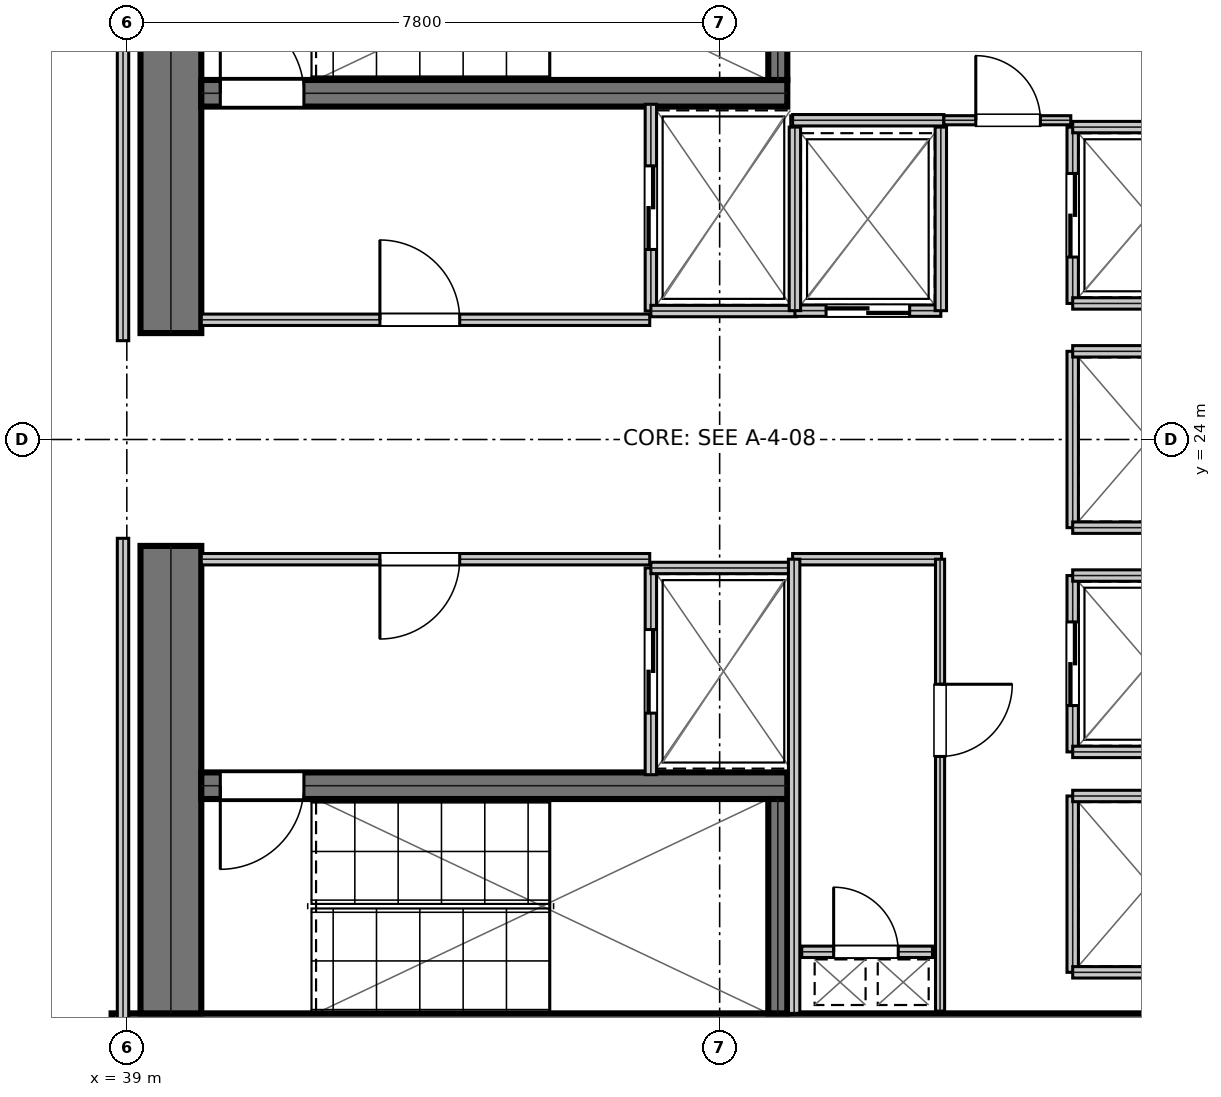
"""IFC4 building model, lengths in metres.
Left out: names, types, materials, properties, quantities, classifications, styles, units other than length and angle.
Written with IfcOpenShell. Run it as: python <this file> out.ifc"""

import sys

from ifc_helpers import new_model, si_unit, direction, frame, frame_2d, origin, place, context, subcontext, project, spatial, rectangle, extrude, element, fill, save


model = new_model("IFC4")
c1 = context("Model", 3, precision=1e-05, world=origin(), true_north=direction((0.0, 1.0)))
c2 = subcontext(c1, "Body", "Model", "MODEL_VIEW")
j1 = project(units=[si_unit("LENGTHUNIT", "METRE"), si_unit("PLANEANGLEUNIT", "RADIAN")], contexts=[c1])
p1 = place(None, origin())
s1 = spatial("IfcSite", under=j1, at=p1, CompositionType="ELEMENT")
p2 = place(p1, origin())
s2 = spatial("IfcBuilding", under=s1, at=p2, CompositionType="ELEMENT")
p3 = place(p2, frame((0.0, 0.0, 133.05)))
s3 = spatial("IfcBuildingStorey", under=s2, at=p3, CompositionType="ELEMENT", Elevation=133.05)
p4 = place(p3, frame((38.8, 16.05, 0.0), z_axis=(0.0, 0.0, 1.0), x_axis=(1.0, 0.0, 0.0)))
e1 = element("IfcWall", 1, at=p4, inside=s3, PredefinedType="SHEAR", context=c2, shape_type="SweptSolid", body=[
    extrude(rectangle(XDim=16.0, YDim=0.8, at=frame_2d((8.0, 0.0))), origin(), (0.0, 0.0, 1.0), 3.81),
])
for number, where, z_axis, x_axis in (
    (2, (39.58, 16.45, 0.0), (0.0, 0.0, 1.0), (0.0, 1.0, 0.0)),
    (3, (39.58, 25.4, 0.0), (0.0, 0.0, 1.0), (0.0, 1.0, 0.0)),
):
    element("IfcWall", number, at=place(p3, frame(where, z_axis=z_axis, x_axis=x_axis)), inside=s3, PredefinedType="SHEAR", context=c2, shape_type="SweptSolid", body=[
        extrude(rectangle(XDim=6.15, YDim=0.8, at=frame_2d((3.075, 0.0))), origin(), (0.0, 0.0, 1.0), 3.81),
    ])
p5 = place(p3, frame((39.98, 28.555, 0.0), z_axis=(0.0, 0.0, 1.0), x_axis=(1.0, 0.0, 0.0)))
e4 = element("IfcWall", 4, at=p5, inside=s3, PredefinedType="SHEAR", context=c2, shape_type="SweptSolid", body=[
    extrude(rectangle(XDim=7.71, YDim=0.35, at=frame_2d((3.855, 0.0))), origin(), (0.0, 0.0, 1.0), 3.81),
])
p6 = place(p5, frame((0.25, 0.0, 0.0)))
e5 = element("IfcOpeningElement", 5, at=p6, cuts=e4, PredefinedType="OPENING", context=c2, shape_type="SweptSolid", body=[
    extrude(rectangle(XDim=1.1, YDim=2.15, at=frame_2d((0.55, 1.075))), frame((0.0, 0.185, 0.0), z_axis=(0.0, -1.0, 0.0), x_axis=(1.0, 0.0, 0.0)), (0.0, 0.0, 1.0), 0.37),
])
p7 = place(p3, frame((39.98, 19.445, 0.0), z_axis=(0.0, 0.0, 1.0), x_axis=(1.0, 0.0, 0.0)))
e6 = element("IfcWall", 6, at=p7, inside=s3, PredefinedType="SHEAR", context=c2, shape_type="SweptSolid", body=[
    extrude(rectangle(XDim=7.71, YDim=0.35, at=frame_2d((3.855, 0.0))), origin(), (0.0, 0.0, 1.0), 3.81),
])
p8 = place(p7, frame((0.25, 0.0, 0.0)))
e7 = element("IfcOpeningElement", 7, at=p8, cuts=e6, PredefinedType="OPENING", context=c2, shape_type="SweptSolid", body=[
    extrude(rectangle(XDim=1.1, YDim=2.15, at=frame_2d((0.55, 1.075))), frame((0.0, 0.185, 0.0), z_axis=(0.0, -1.0, 0.0), x_axis=(1.0, 0.0, 0.0)), (0.0, 0.0, 1.0), 0.37),
])
for number, where, z_axis, x_axis in (
    (8, (47.565, 28.73, 0.0), (0.0, 0.0, 1.0), (0.0, 1.0, 0.0)),
    (9, (47.565, 16.45, 0.0), (0.0, 0.0, 1.0), (0.0, 1.0, 0.0)),
):
    element("IfcWall", number, at=place(p3, frame(where, z_axis=z_axis, x_axis=x_axis)), inside=s3, PredefinedType="SHEAR", context=c2, shape_type="SweptSolid", body=[
        extrude(rectangle(XDim=2.82, YDim=0.25, at=frame_2d((1.41, 0.0))), origin(), (0.0, 0.0, 1.0), 3.81),
    ])
p9 = place(p3, frame((39.98, 25.575, 0.0), z_axis=(0.0, 0.0, 1.0), x_axis=(1.0, 0.0, 0.0)))
e10 = element("IfcWall", 10, at=p9, inside=s3, PredefinedType="PARTITIONING", context=c2, shape_type="SweptSolid", body=[
    extrude(rectangle(XDim=5.9, YDim=0.15, at=frame_2d((2.95, 0.0))), origin(), (0.0, 0.0, 1.0), 3.81),
])
p10 = place(p9, frame((2.35, 0.0, 0.0)))
e11 = element("IfcOpeningElement", 11, at=p10, cuts=e10, PredefinedType="OPENING", context=c2, shape_type="SweptSolid", body=[
    extrude(rectangle(XDim=1.05, YDim=2.15, at=frame_2d((0.525, 1.075))), frame((0.0, 0.085, 0.0), z_axis=(0.0, -1.0, 0.0), x_axis=(1.0, 0.0, 0.0)), (0.0, 0.0, 1.0), 0.17),
])
p11 = place(p3, frame((39.98, 22.425, 0.0), z_axis=(0.0, 0.0, 1.0), x_axis=(1.0, 0.0, 0.0)))
e12 = element("IfcWall", 12, at=p11, inside=s3, PredefinedType="PARTITIONING", context=c2, shape_type="SweptSolid", body=[
    extrude(rectangle(XDim=5.9, YDim=0.15, at=frame_2d((2.95, 0.0))), origin(), (0.0, 0.0, 1.0), 3.81),
])
p12 = place(p11, frame((2.35, 0.0, 0.0)))
e13 = element("IfcOpeningElement", 13, at=p12, cuts=e12, PredefinedType="OPENING", context=c2, shape_type="SweptSolid", body=[
    extrude(rectangle(XDim=1.05, YDim=2.15, at=frame_2d((0.525, 1.075))), frame((0.0, 0.085, 0.0), z_axis=(0.0, -1.0, 0.0), x_axis=(1.0, 0.0, 0.0)), (0.0, 0.0, 1.0), 0.17),
])
p13 = place(p3, frame((45.895, 25.69, 0.0), z_axis=(0.0, 0.0, 1.0), x_axis=(0.0, 1.0, 0.0)))
e14 = element("IfcWall", 14, at=p13, inside=s3, PredefinedType="PARTITIONING", context=c2, shape_type="SweptSolid", body=[
    extrude(rectangle(XDim=2.72, YDim=0.15, at=frame_2d((1.36, 0.0))), origin(), (0.0, 0.0, 1.0), 3.81),
])
p14 = place(p13, frame((0.81, 0.0, 0.0)))
e15 = element("IfcOpeningElement", 15, at=p14, cuts=e14, PredefinedType="OPENING", context=c2, shape_type="SweptSolid", body=[
    extrude(rectangle(XDim=1.1, YDim=2.15, at=frame_2d((0.55, 1.075))), frame((0.0, 0.085, 0.0), z_axis=(0.0, -1.0, 0.0), x_axis=(1.0, 0.0, 0.0)), (0.0, 0.0, 1.0), 0.17),
])
p15 = place(p3, frame((45.895, 25.69, 0.0), z_axis=(0.0, 0.0, 1.0), x_axis=(1.0, 0.0, 0.0)))
e16 = element("IfcWall", 16, at=p15, inside=s3, PredefinedType="PARTITIONING", context=c2, shape_type="SweptSolid", body=[
    extrude(rectangle(XDim=1.915, YDim=0.15, at=frame_2d((0.958, 0.0))), origin(), (0.0, 0.0, 1.0), 3.81),
])
p16 = place(p3, frame((45.895, 19.59, 0.0), z_axis=(0.0, 0.0, 1.0), x_axis=(0.0, 1.0, 0.0)))
e17 = element("IfcWall", 17, at=p16, inside=s3, PredefinedType="PARTITIONING", context=c2, shape_type="SweptSolid", body=[
    extrude(rectangle(XDim=2.72, YDim=0.15, at=frame_2d((1.36, 0.0))), origin(), (0.0, 0.0, 1.0), 3.81),
])
p17 = place(p16, frame((0.81, 0.0, 0.0)))
e18 = element("IfcOpeningElement", 18, at=p17, cuts=e17, PredefinedType="OPENING", context=c2, shape_type="SweptSolid", body=[
    extrude(rectangle(XDim=1.1, YDim=2.15, at=frame_2d((0.55, 1.075))), frame((0.0, 0.085, 0.0), z_axis=(0.0, -1.0, 0.0), x_axis=(1.0, 0.0, 0.0)), (0.0, 0.0, 1.0), 0.17),
])
p18 = place(p3, frame((45.895, 22.31, 0.0), z_axis=(0.0, 0.0, 1.0), x_axis=(1.0, 0.0, 0.0)))
e19 = element("IfcWall", 19, at=p18, inside=s3, PredefinedType="PARTITIONING", context=c2, shape_type="SweptSolid", body=[
    extrude(rectangle(XDim=1.915, YDim=0.15, at=frame_2d((0.958, 0.0))), origin(), (0.0, 0.0, 1.0), 3.81),
])
p19 = place(p3, frame((47.79, 25.695, 0.0), z_axis=(0.0, 0.0, 1.0), x_axis=(1.0, 0.0, 0.0)))
e20 = element("IfcWall", 20, at=p19, inside=s3, PredefinedType="PARTITIONING", context=c2, shape_type="SweptSolid", body=[
    extrude(rectangle(XDim=1.92, YDim=0.15, at=frame_2d((0.96, 0.0))), origin(), (0.0, 0.0, 1.0), 3.81),
])
p20 = place(p19, frame((0.41, 0.0, 0.0)))
e21 = element("IfcOpeningElement", 21, at=p20, cuts=e20, PredefinedType="OPENING", context=c2, shape_type="SweptSolid", body=[
    extrude(rectangle(XDim=1.1, YDim=2.15, at=frame_2d((0.55, 1.075))), frame((0.0, 0.085, 0.0), z_axis=(0.0, -1.0, 0.0), x_axis=(1.0, 0.0, 0.0)), (0.0, 0.0, 1.0), 0.17),
])
for number, where, z_axis, x_axis in (
    (22, (47.79, 25.695, 0.0), (0.0, 0.0, 1.0), (0.0, 1.0, 0.0)),
    (23, (49.71, 25.695, 0.0), (0.0, 0.0, 1.0), (0.0, 1.0, 0.0)),
):
    element("IfcWall", number, at=place(p3, frame(where, z_axis=z_axis, x_axis=x_axis)), inside=s3, PredefinedType="PARTITIONING", context=c2, shape_type="SweptSolid", body=[
        extrude(rectangle(XDim=2.415, YDim=0.15, at=frame_2d((1.208, 0.0))), origin(), (0.0, 0.0, 1.0), 3.81),
    ])
p21 = place(p3, frame((51.445, 25.79, 0.0), z_axis=(0.0, 0.0, 1.0), x_axis=(0.0, 1.0, 0.0)))
e24 = element("IfcWall", 24, at=p21, inside=s3, PredefinedType="PARTITIONING", context=c2, shape_type="SweptSolid", body=[
    extrude(rectangle(XDim=2.32, YDim=0.15, at=frame_2d((1.16, 0.0))), origin(), (0.0, 0.0, 1.0), 3.81),
])
p22 = place(p21, frame((0.61, 0.0, 0.0)))
e25 = element("IfcOpeningElement", 25, at=p22, cuts=e24, PredefinedType="OPENING", context=c2, shape_type="SweptSolid", body=[
    extrude(rectangle(XDim=1.1, YDim=2.15, at=frame_2d((0.55, 1.075))), frame((0.0, 0.085, 0.0), z_axis=(0.0, -1.0, 0.0), x_axis=(1.0, 0.0, 0.0)), (0.0, 0.0, 1.0), 0.17),
])
for number, where, z_axis, x_axis in (
    (26, (51.445, 25.79, 0.0), (0.0, 0.0, 1.0), (1.0, 0.0, 0.0)),
    (27, (51.445, 28.11, 0.0), (0.0, 0.0, 1.0), (1.0, 0.0, 0.0)),
):
    element("IfcWall", number, at=place(p3, frame(where, z_axis=z_axis, x_axis=x_axis)), inside=s3, PredefinedType="PARTITIONING", context=c2, shape_type="SweptSolid", body=[
        extrude(rectangle(XDim=2.015, YDim=0.15, at=frame_2d((1.007, 0.0))), origin(), (0.0, 0.0, 1.0), 3.81),
    ])
p23 = place(p3, frame((51.445, 19.89, 0.0), z_axis=(0.0, 0.0, 1.0), x_axis=(0.0, 1.0, 0.0)))
e28 = element("IfcWall", 28, at=p23, inside=s3, PredefinedType="PARTITIONING", context=c2, shape_type="SweptSolid", body=[
    extrude(rectangle(XDim=2.32, YDim=0.15, at=frame_2d((1.16, 0.0))), origin(), (0.0, 0.0, 1.0), 3.81),
])
p24 = place(p23, frame((0.61, 0.0, 0.0)))
e29 = element("IfcOpeningElement", 29, at=p24, cuts=e28, PredefinedType="OPENING", context=c2, shape_type="SweptSolid", body=[
    extrude(rectangle(XDim=1.1, YDim=2.15, at=frame_2d((0.55, 1.075))), frame((0.0, 0.085, 0.0), z_axis=(0.0, -1.0, 0.0), x_axis=(1.0, 0.0, 0.0)), (0.0, 0.0, 1.0), 0.17),
])
for number, where, z_axis, x_axis in (
    (30, (51.445, 19.89, 0.0), (0.0, 0.0, 1.0), (1.0, 0.0, 0.0)),
    (31, (51.445, 22.21, 0.0), (0.0, 0.0, 1.0), (1.0, 0.0, 0.0)),
):
    element("IfcWall", number, at=place(p3, frame(where, z_axis=z_axis, x_axis=x_axis)), inside=s3, PredefinedType="PARTITIONING", context=c2, shape_type="SweptSolid", body=[
        extrude(rectangle(XDim=2.015, YDim=0.15, at=frame_2d((1.007, 0.0))), origin(), (0.0, 0.0, 1.0), 3.81),
    ])
p25 = place(p3, frame((51.445, 22.84, 0.0), z_axis=(0.0, 0.0, 1.0), x_axis=(0.0, 1.0, 0.0)))
e32 = element("IfcWall", 32, at=p25, inside=s3, PredefinedType="PARTITIONING", context=c2, shape_type="SweptSolid", body=[
    extrude(rectangle(XDim=2.32, YDim=0.15, at=frame_2d((1.16, 0.0))), origin(), (0.0, 0.0, 1.0), 3.81),
])
for number, where, z_axis, x_axis in (
    (33, (51.445, 22.84, 0.0), (0.0, 0.0, 1.0), (1.0, 0.0, 0.0)),
    (34, (51.445, 25.16, 0.0), (0.0, 0.0, 1.0), (1.0, 0.0, 0.0)),
):
    element("IfcWall", number, at=place(p3, frame(where, z_axis=z_axis, x_axis=x_axis)), inside=s3, PredefinedType="PARTITIONING", context=c2, shape_type="SweptSolid", body=[
        extrude(rectangle(XDim=2.015, YDim=0.15, at=frame_2d((1.007, 0.0))), origin(), (0.0, 0.0, 1.0), 3.81),
    ])
p26 = place(p3, frame((51.445, 16.99, 0.0), z_axis=(0.0, 0.0, 1.0), x_axis=(0.0, 1.0, 0.0)))
e35 = element("IfcWall", 35, at=p26, inside=s3, PredefinedType="PARTITIONING", context=c2, shape_type="SweptSolid", body=[
    extrude(rectangle(XDim=2.32, YDim=0.15, at=frame_2d((1.16, 0.0))), origin(), (0.0, 0.0, 1.0), 3.81),
])
for number, where, z_axis, x_axis in (
    (36, (51.445, 16.99, 0.0), (0.0, 0.0, 1.0), (1.0, 0.0, 0.0)),
    (37, (51.445, 19.31, 0.0), (0.0, 0.0, 1.0), (1.0, 0.0, 0.0)),
):
    element("IfcWall", number, at=place(p3, frame(where, z_axis=z_axis, x_axis=x_axis)), inside=s3, PredefinedType="PARTITIONING", context=c2, shape_type="SweptSolid", body=[
        extrude(rectangle(XDim=2.015, YDim=0.15, at=frame_2d((1.007, 0.0))), origin(), (0.0, 0.0, 1.0), 3.81),
    ])
p27 = place(p3, frame((47.88, 17.26, 0.0), z_axis=(0.0, 0.0, 1.0), x_axis=(1.0, 0.0, 0.0)))
e38 = element("IfcWall", 38, at=p27, inside=s3, PredefinedType="PARTITIONING", context=c2, shape_type="SweptSolid", body=[
    extrude(rectangle(XDim=1.72, YDim=0.15, at=frame_2d((0.86, 0.0))), origin(), (0.0, 0.0, 1.0), 3.81),
])
p28 = place(p27, frame((0.42, 0.0, 0.0)))
e39 = element("IfcOpeningElement", 39, at=p28, cuts=e38, PredefinedType="OPENING", context=c2, shape_type="SweptSolid", body=[
    extrude(rectangle(XDim=0.85, YDim=2.15, at=frame_2d((0.425, 1.075))), frame((0.0, 0.085, 0.0), z_axis=(0.0, -1.0, 0.0), x_axis=(1.0, 0.0, 0.0)), (0.0, 0.0, 1.0), 0.17),
])
p29 = place(p3, frame((47.76, 22.425, 0.0), z_axis=(0.0, 0.0, 1.0), x_axis=(1.0, 0.0, 0.0)))
e40 = element("IfcWall", 40, at=p29, inside=s3, PredefinedType="PARTITIONING", context=c2, shape_type="SweptSolid", body=[
    extrude(rectangle(XDim=1.96, YDim=0.15, at=frame_2d((0.98, 0.0))), origin(), (0.0, 0.0, 1.0), 3.81),
])
p30 = place(p3, frame((47.78, 16.45, 0.0), z_axis=(0.0, 0.0, 1.0), x_axis=(0.0, 1.0, 0.0)))
e41 = element("IfcWall", 41, at=p30, inside=s3, PredefinedType="PARTITIONING", context=c2, shape_type="SweptSolid", body=[
    extrude(rectangle(XDim=5.975, YDim=0.15, at=frame_2d((2.988, 0.0))), origin(), (0.0, 0.0, 1.0), 3.81),
])
p31 = place(p3, frame((49.7, 16.48, 0.0), z_axis=(0.0, 0.0, 1.0), x_axis=(0.0, 1.0, 0.0)))
e42 = element("IfcWall", 42, at=p31, inside=s3, PredefinedType="PARTITIONING", context=c2, shape_type="SweptSolid", body=[
    extrude(rectangle(XDim=5.945, YDim=0.12, at=frame_2d((2.973, 0.0))), origin(), (0.0, 0.0, 1.0), 3.81),
])
p32 = place(p31, frame((3.35, 0.0, 0.0)))
e43 = element("IfcOpeningElement", 43, at=p32, cuts=e42, PredefinedType="OPENING", context=c2, shape_type="SweptSolid", body=[
    extrude(rectangle(XDim=0.95, YDim=2.15, at=frame_2d((0.475, 1.075))), frame((0.0, 0.07, 0.0), z_axis=(0.0, -1.0, 0.0), x_axis=(1.0, 0.0, 0.0)), (0.0, 0.0, 1.0), 0.14),
])
p33 = place(p3, frame((47.76, 28.2, 0.0), z_axis=(0.0, 0.0, 1.0), x_axis=(1.0, 0.0, 0.0)))
e44 = element("IfcWall", 44, at=p33, inside=s3, PredefinedType="PARTITIONING", context=c2, shape_type="SweptSolid", body=[
    extrude(rectangle(XDim=1.99, YDim=0.15, at=frame_2d((0.995, 0.0))), origin(), (0.0, 0.0, 1.0), 3.81),
])
p34 = place(p3, frame((49.75, 28.2, 0.0), z_axis=(0.0, 0.0, 1.0), x_axis=(1.0, 0.0, 0.0)))
e45 = element("IfcWall", 45, at=p34, inside=s3, PredefinedType="PARTITIONING", context=c2, shape_type="SweptSolid", body=[
    extrude(rectangle(XDim=1.67, YDim=0.12, at=frame_2d((0.835, 0.0))), origin(), (0.0, 0.0, 1.0), 3.81),
])
p35 = place(p34, frame((0.42, 0.0, 0.0)))
e46 = element("IfcOpeningElement", 46, at=p35, cuts=e45, PredefinedType="OPENING", context=c2, shape_type="SweptSolid", body=[
    extrude(rectangle(XDim=0.85, YDim=2.15, at=frame_2d((0.425, 1.075))), frame((0.0, 0.07, 0.0), z_axis=(0.0, -1.0, 0.0), x_axis=(1.0, 0.0, 0.0)), (0.0, 0.0, 1.0), 0.14),
])
for number, where, z_axis, x_axis in (
    (47, (38.95, 14.5, 0.0), (0.0, 0.0, 1.0), (0.0, 1.0, 0.0)),
    (48, (38.95, 25.3, 0.0), (0.0, 0.0, 1.0), (0.0, 1.0, 0.0)),
):
    element("IfcWall", number, at=place(p3, frame(where, z_axis=z_axis, x_axis=x_axis)), inside=s3, PredefinedType="PARTITIONING", context=c2, shape_type="SweptSolid", body=[
        extrude(rectangle(XDim=8.2, YDim=0.15, at=frame_2d((4.1, 0.0))), origin(), (0.0, 0.0, 1.0), 3.19),
    ])
p36 = place(p10, origin())
e49 = element("IfcDoor", 49, at=p36, inside=s3, OperationType="SINGLE_SWING_LEFT", PredefinedType="DOOR", context=c2, shape_type="SweptSolid", body=[
    extrude(rectangle(XDim=1.05, YDim=2.15, at=frame_2d((0.525, 1.075))), frame((0.0, 0.025, 0.0), z_axis=(0.0, -1.0, 0.0), x_axis=(1.0, 0.0, 0.0)), (0.0, 0.0, 1.0), 0.05),
])
fill(e11, e49)
p37 = place(p12, frame((1.05, 0.0, 0.0), z_axis=(0.0, 0.0, 1.0), x_axis=(-1.0, 0.0, 0.0)))
e50 = element("IfcDoor", 50, at=p37, inside=s3, OperationType="SINGLE_SWING_RIGHT", PredefinedType="DOOR", context=c2, shape_type="SweptSolid", body=[
    extrude(rectangle(XDim=1.05, YDim=2.15, at=frame_2d((0.525, 1.075))), frame((0.0, 0.025, 0.0), z_axis=(0.0, -1.0, 0.0), x_axis=(1.0, 0.0, 0.0)), (0.0, 0.0, 1.0), 0.05),
])
fill(e13, e50)
p38 = place(p14, frame((1.1, 0.0, 0.0), z_axis=(0.0, 0.0, 1.0), x_axis=(-1.0, 0.0, 0.0)))
e51 = element("IfcDoor", 51, at=p38, inside=s3, OperationType="DOUBLE_DOOR_SLIDING", PredefinedType="DOOR", context=c2, shape_type="SweptSolid", body=[
    extrude(rectangle(XDim=1.1, YDim=2.15, at=frame_2d((0.55, 1.075))), frame((0.0, 0.025, 0.0), z_axis=(0.0, -1.0, 0.0), x_axis=(1.0, 0.0, 0.0)), (0.0, 0.0, 1.0), 0.05),
])
fill(e15, e51)
p39 = place(p17, frame((1.1, 0.0, 0.0), z_axis=(0.0, 0.0, 1.0), x_axis=(-1.0, 0.0, 0.0)))
e52 = element("IfcDoor", 52, at=p39, inside=s3, OperationType="DOUBLE_DOOR_SLIDING", PredefinedType="DOOR", context=c2, shape_type="SweptSolid", body=[
    extrude(rectangle(XDim=1.1, YDim=2.15, at=frame_2d((0.55, 1.075))), frame((0.0, 0.025, 0.0), z_axis=(0.0, -1.0, 0.0), x_axis=(1.0, 0.0, 0.0)), (0.0, 0.0, 1.0), 0.05),
])
fill(e18, e52)
p40 = place(p20, frame((1.1, 0.0, 0.0), z_axis=(0.0, 0.0, 1.0), x_axis=(-1.0, 0.0, 0.0)))
e53 = element("IfcDoor", 53, at=p40, inside=s3, OperationType="DOUBLE_DOOR_SLIDING", PredefinedType="DOOR", context=c2, shape_type="SweptSolid", body=[
    extrude(rectangle(XDim=1.1, YDim=2.15, at=frame_2d((0.55, 1.075))), frame((0.0, 0.025, 0.0), z_axis=(0.0, -1.0, 0.0), x_axis=(1.0, 0.0, 0.0)), (0.0, 0.0, 1.0), 0.05),
])
fill(e21, e53)
p41 = place(p22, frame((1.1, 0.0, 0.0), z_axis=(0.0, 0.0, 1.0), x_axis=(-1.0, 0.0, 0.0)))
e54 = element("IfcDoor", 54, at=p41, inside=s3, OperationType="DOUBLE_DOOR_SLIDING", PredefinedType="DOOR", context=c2, shape_type="SweptSolid", body=[
    extrude(rectangle(XDim=1.1, YDim=2.15, at=frame_2d((0.55, 1.075))), frame((0.0, 0.025, 0.0), z_axis=(0.0, -1.0, 0.0), x_axis=(1.0, 0.0, 0.0)), (0.0, 0.0, 1.0), 0.05),
])
fill(e25, e54)
p42 = place(p24, frame((1.1, 0.0, 0.0), z_axis=(0.0, 0.0, 1.0), x_axis=(-1.0, 0.0, 0.0)))
e55 = element("IfcDoor", 55, at=p42, inside=s3, OperationType="DOUBLE_DOOR_SLIDING", PredefinedType="DOOR", context=c2, shape_type="SweptSolid", body=[
    extrude(rectangle(XDim=1.1, YDim=2.15, at=frame_2d((0.55, 1.075))), frame((0.0, 0.025, 0.0), z_axis=(0.0, -1.0, 0.0), x_axis=(1.0, 0.0, 0.0)), (0.0, 0.0, 1.0), 0.05),
])
fill(e29, e55)
p43 = place(p28, origin())
e56 = element("IfcDoor", 56, at=p43, inside=s3, OperationType="SINGLE_SWING_LEFT", PredefinedType="TRAPDOOR", context=c2, shape_type="SweptSolid", body=[
    extrude(rectangle(XDim=0.85, YDim=2.15, at=frame_2d((0.425, 1.075))), frame((0.0, 0.025, 0.0), z_axis=(0.0, -1.0, 0.0), x_axis=(1.0, 0.0, 0.0)), (0.0, 0.0, 1.0), 0.05),
])
fill(e39, e56)
p44 = place(p32, frame((0.95, 0.0, 0.0), z_axis=(0.0, 0.0, 1.0), x_axis=(-1.0, 0.0, 0.0)))
e57 = element("IfcDoor", 57, at=p44, inside=s3, OperationType="SINGLE_SWING_LEFT", PredefinedType="DOOR", context=c2, shape_type="SweptSolid", body=[
    extrude(rectangle(XDim=0.95, YDim=2.15, at=frame_2d((0.475, 1.075))), frame((0.0, 0.025, 0.0), z_axis=(0.0, -1.0, 0.0), x_axis=(1.0, 0.0, 0.0)), (0.0, 0.0, 1.0), 0.05),
])
fill(e43, e57)
p45 = place(p35, origin())
e58 = element("IfcDoor", 58, at=p45, inside=s3, OperationType="SINGLE_SWING_LEFT", PredefinedType="DOOR", context=c2, shape_type="SweptSolid", body=[
    extrude(rectangle(XDim=0.85, YDim=2.15, at=frame_2d((0.425, 1.075))), frame((0.0, 0.025, 0.0), z_axis=(0.0, -1.0, 0.0), x_axis=(1.0, 0.0, 0.0)), (0.0, 0.0, 1.0), 0.05),
])
fill(e46, e58)
p46 = place(p6, origin())
e59 = element("IfcDoor", 59, at=p46, inside=s3, OperationType="SINGLE_SWING_LEFT", PredefinedType="DOOR", context=c2, shape_type="SweptSolid", body=[
    extrude(rectangle(XDim=1.1, YDim=2.15, at=frame_2d((0.55, 1.075))), frame((0.0, 0.025, 0.0), z_axis=(0.0, -1.0, 0.0), x_axis=(1.0, 0.0, 0.0)), (0.0, 0.0, 1.0), 0.05),
])
fill(e5, e59)
p47 = place(p8, frame((1.1, 0.0, 0.0), z_axis=(0.0, 0.0, 1.0), x_axis=(-1.0, 0.0, 0.0)))
e60 = element("IfcDoor", 60, at=p47, inside=s3, OperationType="SINGLE_SWING_RIGHT", PredefinedType="DOOR", context=c2, shape_type="SweptSolid", body=[
    extrude(rectangle(XDim=1.1, YDim=2.15, at=frame_2d((0.55, 1.075))), frame((0.0, 0.025, 0.0), z_axis=(0.0, -1.0, 0.0), x_axis=(1.0, 0.0, 0.0)), (0.0, 0.0, 1.0), 0.05),
])
fill(e7, e60)
save(model, sys.argv[1])
